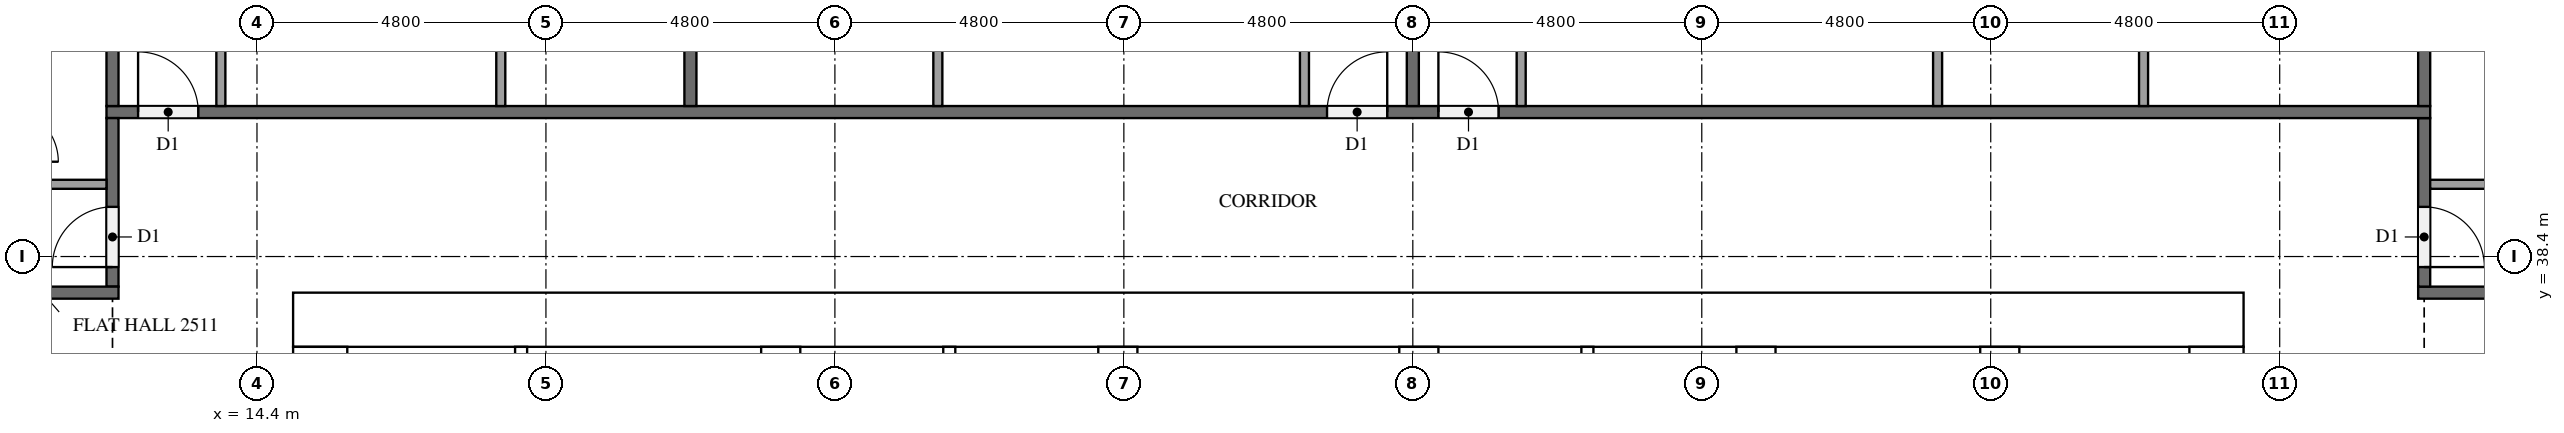
"""IFC4 building model, lengths in metres.
Left out: names, types, materials, properties, quantities, classifications, styles, units other than length and angle.
Written with IfcOpenShell. Run it as: python <this file> out.ifc"""

import sys

from ifc_helpers import new_model, si_unit, direction, frame, frame_2d, origin, place, context, subcontext, project, spatial, rectangle, extrude, element, fill, save


model = new_model("IFC4")
c1 = context("Model", 3, precision=1e-05, world=origin(), true_north=direction((0.0, 1.0)))
c2 = subcontext(c1, "Body", "Model", "MODEL_VIEW")
j1 = project(units=[si_unit("LENGTHUNIT", "METRE"), si_unit("PLANEANGLEUNIT", "RADIAN")], contexts=[c1])
p1 = place(None, origin())
s1 = spatial("IfcSite", under=j1, at=p1, CompositionType="ELEMENT")
p2 = place(p1, origin())
s2 = spatial("IfcBuilding", under=s1, at=p2, CompositionType="ELEMENT")
p3 = place(p2, frame((0.0, 0.0, 99.7)))
s3 = spatial("IfcBuildingStorey", under=s2, at=p3, CompositionType="ELEMENT", Elevation=99.7)
p4 = place(p3, frame((15.0, 37.35, 0.0), z_axis=(0.0, 0.0, 1.0), x_axis=(1.0, 0.0, 0.0)))
e1 = element("IfcWall", 1, at=p4, inside=s3, PredefinedType="SHEAR", context=c2, shape_type="SweptSolid", body=[
    extrude(rectangle(XDim=32.4, YDim=0.9, at=frame_2d((16.2, 0.0))), origin(), (0.0, 0.0, 1.0), 3.2),
])
p5 = place(p4, frame((15.3, 0.0, 0.0)))
e2 = element("IfcOpeningElement", 2, at=p5, cuts=e1, PredefinedType="OPENING", context=c2, shape_type="SweptSolid", body=[
    extrude(rectangle(XDim=1.8, YDim=2.1, at=frame_2d((0.9, 1.05))), frame((0.0, 0.46, 0.0), z_axis=(0.0, -1.0, 0.0), x_axis=(1.0, 0.0, 0.0)), (0.0, 0.0, 1.0), 0.92),
])
p6 = place(p4, frame((1.794, 0.0, 0.0)))
e3 = element("IfcOpeningElement", 3, at=p6, cuts=e1, PredefinedType="OPENING", context=c2, shape_type="SweptSolid", body=[
    extrude(rectangle(XDim=1.0, YDim=2.1, at=frame_2d((0.5, 1.05))), frame((0.0, 0.46, 0.0), z_axis=(0.0, -1.0, 0.0), x_axis=(1.0, 0.0, 0.0)), (0.0, 0.0, 1.0), 0.92),
])
p7 = place(p4, frame((5.331, 0.0, 0.0)))
e4 = element("IfcOpeningElement", 4, at=p7, cuts=e1, PredefinedType="OPENING", context=c2, shape_type="SweptSolid", body=[
    extrude(rectangle(XDim=1.0, YDim=2.1, at=frame_2d((0.5, 1.05))), frame((0.0, 0.46, 0.0), z_axis=(0.0, -1.0, 0.0), x_axis=(1.0, 0.0, 0.0)), (0.0, 0.0, 1.0), 0.92),
])
p8 = place(p3, frame((15.45, 15.9, 0.0), z_axis=(0.0, 0.0, 1.0), x_axis=(0.0, 1.0, 0.0)))
e5 = element("IfcWall", 5, at=p8, inside=s3, PredefinedType="SHEAR", context=c2, shape_type="SweptSolid", body=[
    extrude(rectangle(XDim=21.0, YDim=0.9, at=frame_2d((10.5, 0.0))), origin(), (0.0, 0.0, 1.0), 3.2),
])
p9 = place(p8, frame((4.86, 0.0, 0.0)))
e6 = element("IfcOpeningElement", 6, at=p9, cuts=e5, PredefinedType="OPENING", context=c2, shape_type="SweptSolid", body=[
    extrude(rectangle(XDim=1.2, YDim=2.1, at=frame_2d((0.6, 1.05))), frame((0.0, 0.46, 0.0), z_axis=(0.0, -1.0, 0.0), x_axis=(1.0, 0.0, 0.0)), (0.0, 0.0, 1.0), 0.92),
])
p10 = place(p3, frame((46.95, 15.9, 0.0), z_axis=(0.0, 0.0, 1.0), x_axis=(0.0, 1.0, 0.0)))
e7 = element("IfcWall", 7, at=p10, inside=s3, PredefinedType="SHEAR", context=c2, shape_type="SweptSolid", body=[
    extrude(rectangle(XDim=21.0, YDim=0.9, at=frame_2d((10.5, 0.0))), origin(), (0.0, 0.0, 1.0), 3.2),
])
p11 = place(p10, frame((10.2, 0.0, 0.0)))
e8 = element("IfcOpeningElement", 8, at=p11, cuts=e7, PredefinedType="OPENING", context=c2, shape_type="SweptSolid", body=[
    extrude(rectangle(XDim=1.2, YDim=2.1, at=frame_2d((0.6, 1.05))), frame((0.0, 0.46, 0.0), z_axis=(0.0, -1.0, 0.0), x_axis=(1.0, 0.0, 0.0)), (0.0, 0.0, 1.0), 0.92),
])
p12 = place(p3, frame((23.1, 15.9, 0.0), z_axis=(0.0, 0.0, 1.0), x_axis=(0.0, 1.0, 0.0)))
e9 = element("IfcWall", 9, at=p12, inside=s3, PredefinedType="SHEAR", context=c2, shape_type="SweptSolid", body=[
    extrude(rectangle(XDim=21.0, YDim=0.65, at=frame_2d((10.5, 0.0))), origin(), (0.0, 0.0, 1.0), 3.2),
])
p13 = place(p3, frame((39.3, 27.75, 0.0), z_axis=(0.0, 0.0, 1.0), x_axis=(0.0, 1.0, 0.0)))
e10 = element("IfcWall", 10, at=p13, inside=s3, PredefinedType="SHEAR", context=c2, shape_type="SweptSolid", body=[
    extrude(rectangle(XDim=9.15, YDim=0.65, at=frame_2d((4.575, 0.0))), origin(), (0.0, 0.0, 1.0), 3.2),
])
p14 = place(p3, frame((43.35, 27.75, 0.0), z_axis=(0.0, 0.0, 1.0), x_axis=(0.0, 1.0, 0.0)))
e11 = element("IfcWall", 11, at=p14, inside=s3, PredefinedType="SHEAR", context=c2, shape_type="SweptSolid", body=[
    extrude(rectangle(XDim=9.15, YDim=0.65, at=frame_2d((4.575, 0.0))), origin(), (0.0, 0.0, 1.0), 3.2),
])
p15 = place(p14, frame((7.65, 0.0, 0.0)))
e12 = element("IfcOpeningElement", 12, at=p15, cuts=e11, PredefinedType="OPENING", context=c2, shape_type="SweptSolid", body=[
    extrude(rectangle(XDim=1.2, YDim=2.1, at=frame_2d((0.6, 1.05))), frame((0.0, 0.335, 0.0), z_axis=(0.0, -1.0, 0.0), x_axis=(1.0, 0.0, 0.0)), (0.0, 0.0, 1.0), 0.67),
])
for number, where, z_axis, x_axis in (
    (13, (28.7, 33.875, 0.0), (0.0, 0.0, 1.0), (0.0, 1.0, 0.0)),
    (14, (33.7, 33.875, 0.0), (0.0, 0.0, 1.0), (0.0, 1.0, 0.0)),
):
    element("IfcWall", number, at=place(p3, frame(where, z_axis=z_axis, x_axis=x_axis)), inside=s3, PredefinedType="SHEAR", context=c2, shape_type="SweptSolid", body=[
        extrude(rectangle(XDim=3.025, YDim=0.65, at=frame_2d((1.512, 0.0))), origin(), (0.0, 0.0, 1.0), 3.2),
    ])
for number, where, z_axis, x_axis in (
    (15, (25.9, 33.875, 0.0), (0.0, 0.0, 1.0), (0.0, 1.0, 0.0)),
    (16, (36.5, 33.875, 0.0), (0.0, 0.0, 1.0), (0.0, 1.0, 0.0)),
):
    element("IfcWall", number, at=place(p3, frame(where, z_axis=z_axis, x_axis=x_axis)), inside=s3, PredefinedType="SOLIDWALL", context=c2, shape_type="SweptSolid", body=[
        extrude(rectangle(XDim=3.025, YDim=0.2, at=frame_2d((1.512, 0.0))), origin(), (0.0, 0.0, 1.0), 3.2),
    ])
p16 = place(p3, frame((18.788, 31.575, 0.0), z_axis=(0.0, 0.0, 1.0), x_axis=(0.0, 1.0, 0.0)))
e17 = element("IfcWall", 17, at=p16, inside=s3, PredefinedType="PARTITIONING", context=c2, shape_type="SweptSolid", body=[
    extrude(rectangle(XDim=5.325, YDim=0.2, at=frame_2d((2.663, 0.0))), origin(), (0.0, 0.0, 1.0), 3.2),
])
p17 = place(p3, frame((52.5, 37.8, 0.0), z_axis=(0.0, 0.0, 1.0), x_axis=(-1.0, 0.0, 0.0)))
e18 = element("IfcWall", 18, at=p17, inside=s3, PredefinedType="PARTITIONING", context=c2, shape_type="SweptSolid", body=[
    extrude(rectangle(XDim=2.2, YDim=0.2, at=frame_2d((1.1, 0.0))), origin(), (0.0, 0.0, 1.0), 3.2),
])
p18 = place(p3, frame((50.4, 40.7, 0.0), z_axis=(0.0, 0.0, 1.0), x_axis=(0.0, -1.0, 0.0)))
e19 = element("IfcWall", 19, at=p18, inside=s3, PredefinedType="PARTITIONING", context=c2, shape_type="SweptSolid", body=[
    extrude(rectangle(XDim=2.8, YDim=0.2, at=frame_2d((1.4, 0.0))), origin(), (0.0, 0.0, 1.0), 3.2),
])
p19 = place(p18, frame((1.475, 0.0, 0.0)))
e20 = element("IfcOpeningElement", 20, at=p19, cuts=e19, PredefinedType="OPENING", context=c2, shape_type="SweptSolid", body=[
    extrude(rectangle(XDim=1.0, YDim=2.1, at=frame_2d((0.5, 1.05))), frame((0.0, 0.11, 0.0), z_axis=(0.0, -1.0, 0.0), x_axis=(1.0, 0.0, 0.0)), (0.0, 0.0, 1.0), 0.22),
])
p20 = place(p3, frame((11.9, 40.8, 0.0), z_axis=(0.0, 0.0, 1.0), x_axis=(1.0, 0.0, 0.0)))
e21 = element("IfcWall", 21, at=p20, inside=s3, PredefinedType="PARTITIONING", context=c2, shape_type="SweptSolid", body=[
    extrude(rectangle(XDim=38.6, YDim=0.2, at=frame_2d((19.3, 0.0))), origin(), (0.0, 0.0, 1.0), 3.2),
])
p21 = place(p20, frame((22.125, 0.0, 0.0)))
e22 = element("IfcOpeningElement", 22, at=p21, cuts=e21, PredefinedType="OPENING", context=c2, shape_type="SweptSolid", body=[
    extrude(rectangle(XDim=1.0, YDim=2.1, at=frame_2d((0.5, 1.05))), frame((0.0, 0.11, 0.0), z_axis=(0.0, -1.0, 0.0), x_axis=(1.0, 0.0, 0.0)), (0.0, 0.0, 1.0), 0.22),
])
p22 = place(p20, frame((20.275, 0.0, 0.0)))
e23 = element("IfcOpeningElement", 23, at=p22, cuts=e21, PredefinedType="OPENING", context=c2, shape_type="SweptSolid", body=[
    extrude(rectangle(XDim=1.0, YDim=2.1, at=frame_2d((0.5, 1.05))), frame((0.0, 0.11, 0.0), z_axis=(0.0, -1.0, 0.0), x_axis=(1.0, 0.0, 0.0)), (0.0, 0.0, 1.0), 0.22),
])
p23 = place(p20, frame((0.525, 0.0, 0.0)))
e24 = element("IfcOpeningElement", 24, at=p23, cuts=e21, PredefinedType="OPENING", context=c2, shape_type="SweptSolid", body=[
    extrude(rectangle(XDim=1.0, YDim=2.1, at=frame_2d((0.5, 1.05))), frame((0.0, 0.11, 0.0), z_axis=(0.0, -1.0, 0.0), x_axis=(1.0, 0.0, 0.0)), (0.0, 0.0, 1.0), 0.22),
])
p24 = place(p3, frame((12.0, 37.9, 0.0), z_axis=(0.0, 0.0, 1.0), x_axis=(0.0, 1.0, 0.0)))
e25 = element("IfcWall", 25, at=p24, inside=s3, PredefinedType="PARTITIONING", context=c2, shape_type="SweptSolid", body=[
    extrude(rectangle(XDim=2.8, YDim=0.2, at=frame_2d((1.4, 0.0))), origin(), (0.0, 0.0, 1.0), 3.2),
])
p25 = place(p24, frame((0.325, 0.0, 0.0)))
e26 = element("IfcOpeningElement", 26, at=p25, cuts=e25, PredefinedType="OPENING", context=c2, shape_type="SweptSolid", body=[
    extrude(rectangle(XDim=1.0, YDim=2.1, at=frame_2d((0.5, 1.05))), frame((0.0, 0.11, 0.0), z_axis=(0.0, -1.0, 0.0), x_axis=(1.0, 0.0, 0.0)), (0.0, 0.0, 1.0), 0.22),
])
p26 = place(p3, frame((12.1, 37.8, 0.0), z_axis=(0.0, 0.0, 1.0), x_axis=(-1.0, 0.0, 0.0)))
e27 = element("IfcWall", 27, at=p26, inside=s3, PredefinedType="PARTITIONING", context=c2, shape_type="SweptSolid", body=[
    extrude(rectangle(XDim=2.2, YDim=0.2, at=frame_2d((1.1, 0.0))), origin(), (0.0, 0.0, 1.0), 3.2),
])
for number, where, z_axis, x_axis in (
    (28, (50.4, 40.9, 0.0), (0.0, 0.0, 1.0), (0.0, 1.0, 0.0)),
    (29, (33.6, 52.7, 0.0), (0.0, 0.0, 1.0), (0.0, -1.0, 0.0)),
    (30, (21.6, 52.7, 0.0), (0.0, 0.0, 1.0), (0.0, -1.0, 0.0)),
    (31, (12.0, 52.7, 0.0), (0.0, 0.0, 1.0), (0.0, -1.0, 0.0)),
):
    element("IfcWall", number, at=place(p3, frame(where, z_axis=z_axis, x_axis=x_axis)), inside=s3, PredefinedType="PARTITIONING", context=c2, shape_type="SweptSolid", body=[
        extrude(rectangle(XDim=11.8, YDim=0.2, at=frame_2d((5.9, 0.0))), origin(), (0.0, 0.0, 1.0), 3.2),
    ])
p27 = place(p3, frame((50.5, 39.6, 0.0), z_axis=(0.0, 0.0, 1.0), x_axis=(1.0, 0.0, 0.0)))
e32 = element("IfcWall", 32, at=p27, inside=s3, PredefinedType="PARTITIONING", context=c2, shape_type="SweptSolid", body=[
    extrude(rectangle(XDim=4.625, YDim=0.15, at=frame_2d((2.312, 0.0))), origin(), (0.0, 0.0, 1.0), 3.2),
])
for number, where, z_axis, x_axis in (
    (33, (42.317, 40.9, 0.0), (0.0, 0.0, 1.0), (0.0, 1.0, 0.0)),
    (34, (45.739, 40.9, 0.0), (0.0, 0.0, 1.0), (0.0, 1.0, 0.0)),
):
    element("IfcWall", number, at=place(p3, frame(where, z_axis=z_axis, x_axis=x_axis)), inside=s3, PredefinedType="PARTITIONING", context=c2, shape_type="SweptSolid", body=[
        extrude(rectangle(XDim=3.875, YDim=0.15, at=frame_2d((1.938, 0.0))), origin(), (0.0, 0.0, 1.0), 3.2),
    ])
p28 = place(p3, frame((35.4, 40.9, 0.0), z_axis=(0.0, 0.0, 1.0), x_axis=(0.0, 1.0, 0.0)))
e35 = element("IfcWall", 35, at=p28, inside=s3, PredefinedType="PARTITIONING", context=c2, shape_type="SweptSolid", body=[
    extrude(rectangle(XDim=4.025, YDim=0.15, at=frame_2d((2.013, 0.0))), origin(), (0.0, 0.0, 1.0), 3.2),
])
p29 = place(p3, frame((25.71, 40.9, 0.0), z_axis=(0.0, 0.0, 1.0), x_axis=(0.0, 1.0, 0.0)))
e36 = element("IfcWall", 36, at=p29, inside=s3, PredefinedType="PARTITIONING", context=c2, shape_type="SweptSolid", body=[
    extrude(rectangle(XDim=3.125, YDim=0.15, at=frame_2d((1.562, 0.0))), origin(), (0.0, 0.0, 1.0), 3.2),
])
p30 = place(p3, frame((31.8, 40.9, 0.0), z_axis=(0.0, 0.0, 1.0), x_axis=(0.0, 1.0, 0.0)))
e37 = element("IfcWall", 37, at=p30, inside=s3, PredefinedType="PARTITIONING", context=c2, shape_type="SweptSolid", body=[
    extrude(rectangle(XDim=3.275, YDim=0.15, at=frame_2d((1.638, 0.0))), origin(), (0.0, 0.0, 1.0), 3.2),
])
p31 = place(p3, frame((18.45, 40.9, 0.0), z_axis=(0.0, 0.0, 1.0), x_axis=(0.0, 1.0, 0.0)))
e38 = element("IfcWall", 38, at=p31, inside=s3, PredefinedType="PARTITIONING", context=c2, shape_type="SweptSolid", body=[
    extrude(rectangle(XDim=3.875, YDim=0.15, at=frame_2d((1.938, 0.0))), origin(), (0.0, 0.0, 1.0), 3.2),
])
p32 = place(p3, frame((13.8, 40.9, 0.0), z_axis=(0.0, 0.0, 1.0), x_axis=(0.0, 1.0, 0.0)))
e39 = element("IfcWall", 39, at=p32, inside=s3, PredefinedType="PARTITIONING", context=c2, shape_type="SweptSolid", body=[
    extrude(rectangle(XDim=4.025, YDim=0.15, at=frame_2d((2.013, 0.0))), origin(), (0.0, 0.0, 1.0), 3.2),
])
p33 = place(p3, frame((11.9, 39.6, 0.0), z_axis=(0.0, 0.0, 1.0), x_axis=(-1.0, 0.0, 0.0)))
e40 = element("IfcWall", 40, at=p33, inside=s3, PredefinedType="PARTITIONING", context=c2, shape_type="SweptSolid", body=[
    extrude(rectangle(XDim=1.775, YDim=0.15, at=frame_2d((0.887, 0.0))), origin(), (0.0, 0.0, 1.0), 3.2),
])
p34 = place(p5, origin())
e41 = element("IfcDoor", 41, at=p34, inside=s3, OperationType="DOUBLE_DOOR_SINGLE_SWING", PredefinedType="DOOR", context=c2, shape_type="SweptSolid", body=[
    extrude(rectangle(XDim=1.8, YDim=2.1, at=frame_2d((0.9, 1.05))), frame((0.0, 0.025, 0.0), z_axis=(0.0, -1.0, 0.0), x_axis=(1.0, 0.0, 0.0)), (0.0, 0.0, 1.0), 0.05),
])
fill(e2, e41)
p35 = place(p6, origin())
e42 = element("IfcDoor", 42, at=p35, inside=s3, OperationType="SINGLE_SWING_RIGHT", PredefinedType="DOOR", context=c2, shape_type="SweptSolid", body=[
    extrude(rectangle(XDim=1.0, YDim=2.1, at=frame_2d((0.5, 1.05))), frame((0.0, 0.025, 0.0), z_axis=(0.0, -1.0, 0.0), x_axis=(1.0, 0.0, 0.0)), (0.0, 0.0, 1.0), 0.05),
])
fill(e3, e42)
p36 = place(p7, origin())
e43 = element("IfcDoor", 43, at=p36, inside=s3, OperationType="SINGLE_SWING_LEFT", PredefinedType="DOOR", context=c2, shape_type="SweptSolid", body=[
    extrude(rectangle(XDim=1.0, YDim=2.1, at=frame_2d((0.5, 1.05))), frame((0.0, 0.025, 0.0), z_axis=(0.0, -1.0, 0.0), x_axis=(1.0, 0.0, 0.0)), (0.0, 0.0, 1.0), 0.05),
])
fill(e4, e43)
p37 = place(p19, origin())
e44 = element("IfcDoor", 44, at=p37, inside=s3, OperationType="SINGLE_SWING_RIGHT", PredefinedType="DOOR", context=c2, shape_type="SweptSolid", body=[
    extrude(rectangle(XDim=1.0, YDim=2.1, at=frame_2d((0.5, 1.05))), frame((0.0, 0.025, 0.0), z_axis=(0.0, -1.0, 0.0), x_axis=(1.0, 0.0, 0.0)), (0.0, 0.0, 1.0), 0.05),
])
fill(e20, e44)
p38 = place(p21, origin())
e45 = element("IfcDoor", 45, at=p38, inside=s3, OperationType="SINGLE_SWING_LEFT", PredefinedType="DOOR", context=c2, shape_type="SweptSolid", body=[
    extrude(rectangle(XDim=1.0, YDim=2.1, at=frame_2d((0.5, 1.05))), frame((0.0, 0.025, 0.0), z_axis=(0.0, -1.0, 0.0), x_axis=(1.0, 0.0, 0.0)), (0.0, 0.0, 1.0), 0.05),
])
fill(e22, e45)
p39 = place(p22, origin())
e46 = element("IfcDoor", 46, at=p39, inside=s3, OperationType="SINGLE_SWING_RIGHT", PredefinedType="DOOR", context=c2, shape_type="SweptSolid", body=[
    extrude(rectangle(XDim=1.0, YDim=2.1, at=frame_2d((0.5, 1.05))), frame((0.0, 0.025, 0.0), z_axis=(0.0, -1.0, 0.0), x_axis=(1.0, 0.0, 0.0)), (0.0, 0.0, 1.0), 0.05),
])
fill(e23, e46)
p40 = place(p23, origin())
e47 = element("IfcDoor", 47, at=p40, inside=s3, OperationType="SINGLE_SWING_LEFT", PredefinedType="DOOR", context=c2, shape_type="SweptSolid", body=[
    extrude(rectangle(XDim=1.0, YDim=2.1, at=frame_2d((0.5, 1.05))), frame((0.0, 0.025, 0.0), z_axis=(0.0, -1.0, 0.0), x_axis=(1.0, 0.0, 0.0)), (0.0, 0.0, 1.0), 0.05),
])
fill(e24, e47)
p41 = place(p25, origin())
e48 = element("IfcDoor", 48, at=p41, inside=s3, OperationType="SINGLE_SWING_LEFT", PredefinedType="DOOR", context=c2, shape_type="SweptSolid", body=[
    extrude(rectangle(XDim=1.0, YDim=2.1, at=frame_2d((0.5, 1.05))), frame((0.0, 0.025, 0.0), z_axis=(0.0, -1.0, 0.0), x_axis=(1.0, 0.0, 0.0)), (0.0, 0.0, 1.0), 0.05),
])
fill(e26, e48)
save(model, sys.argv[1])
